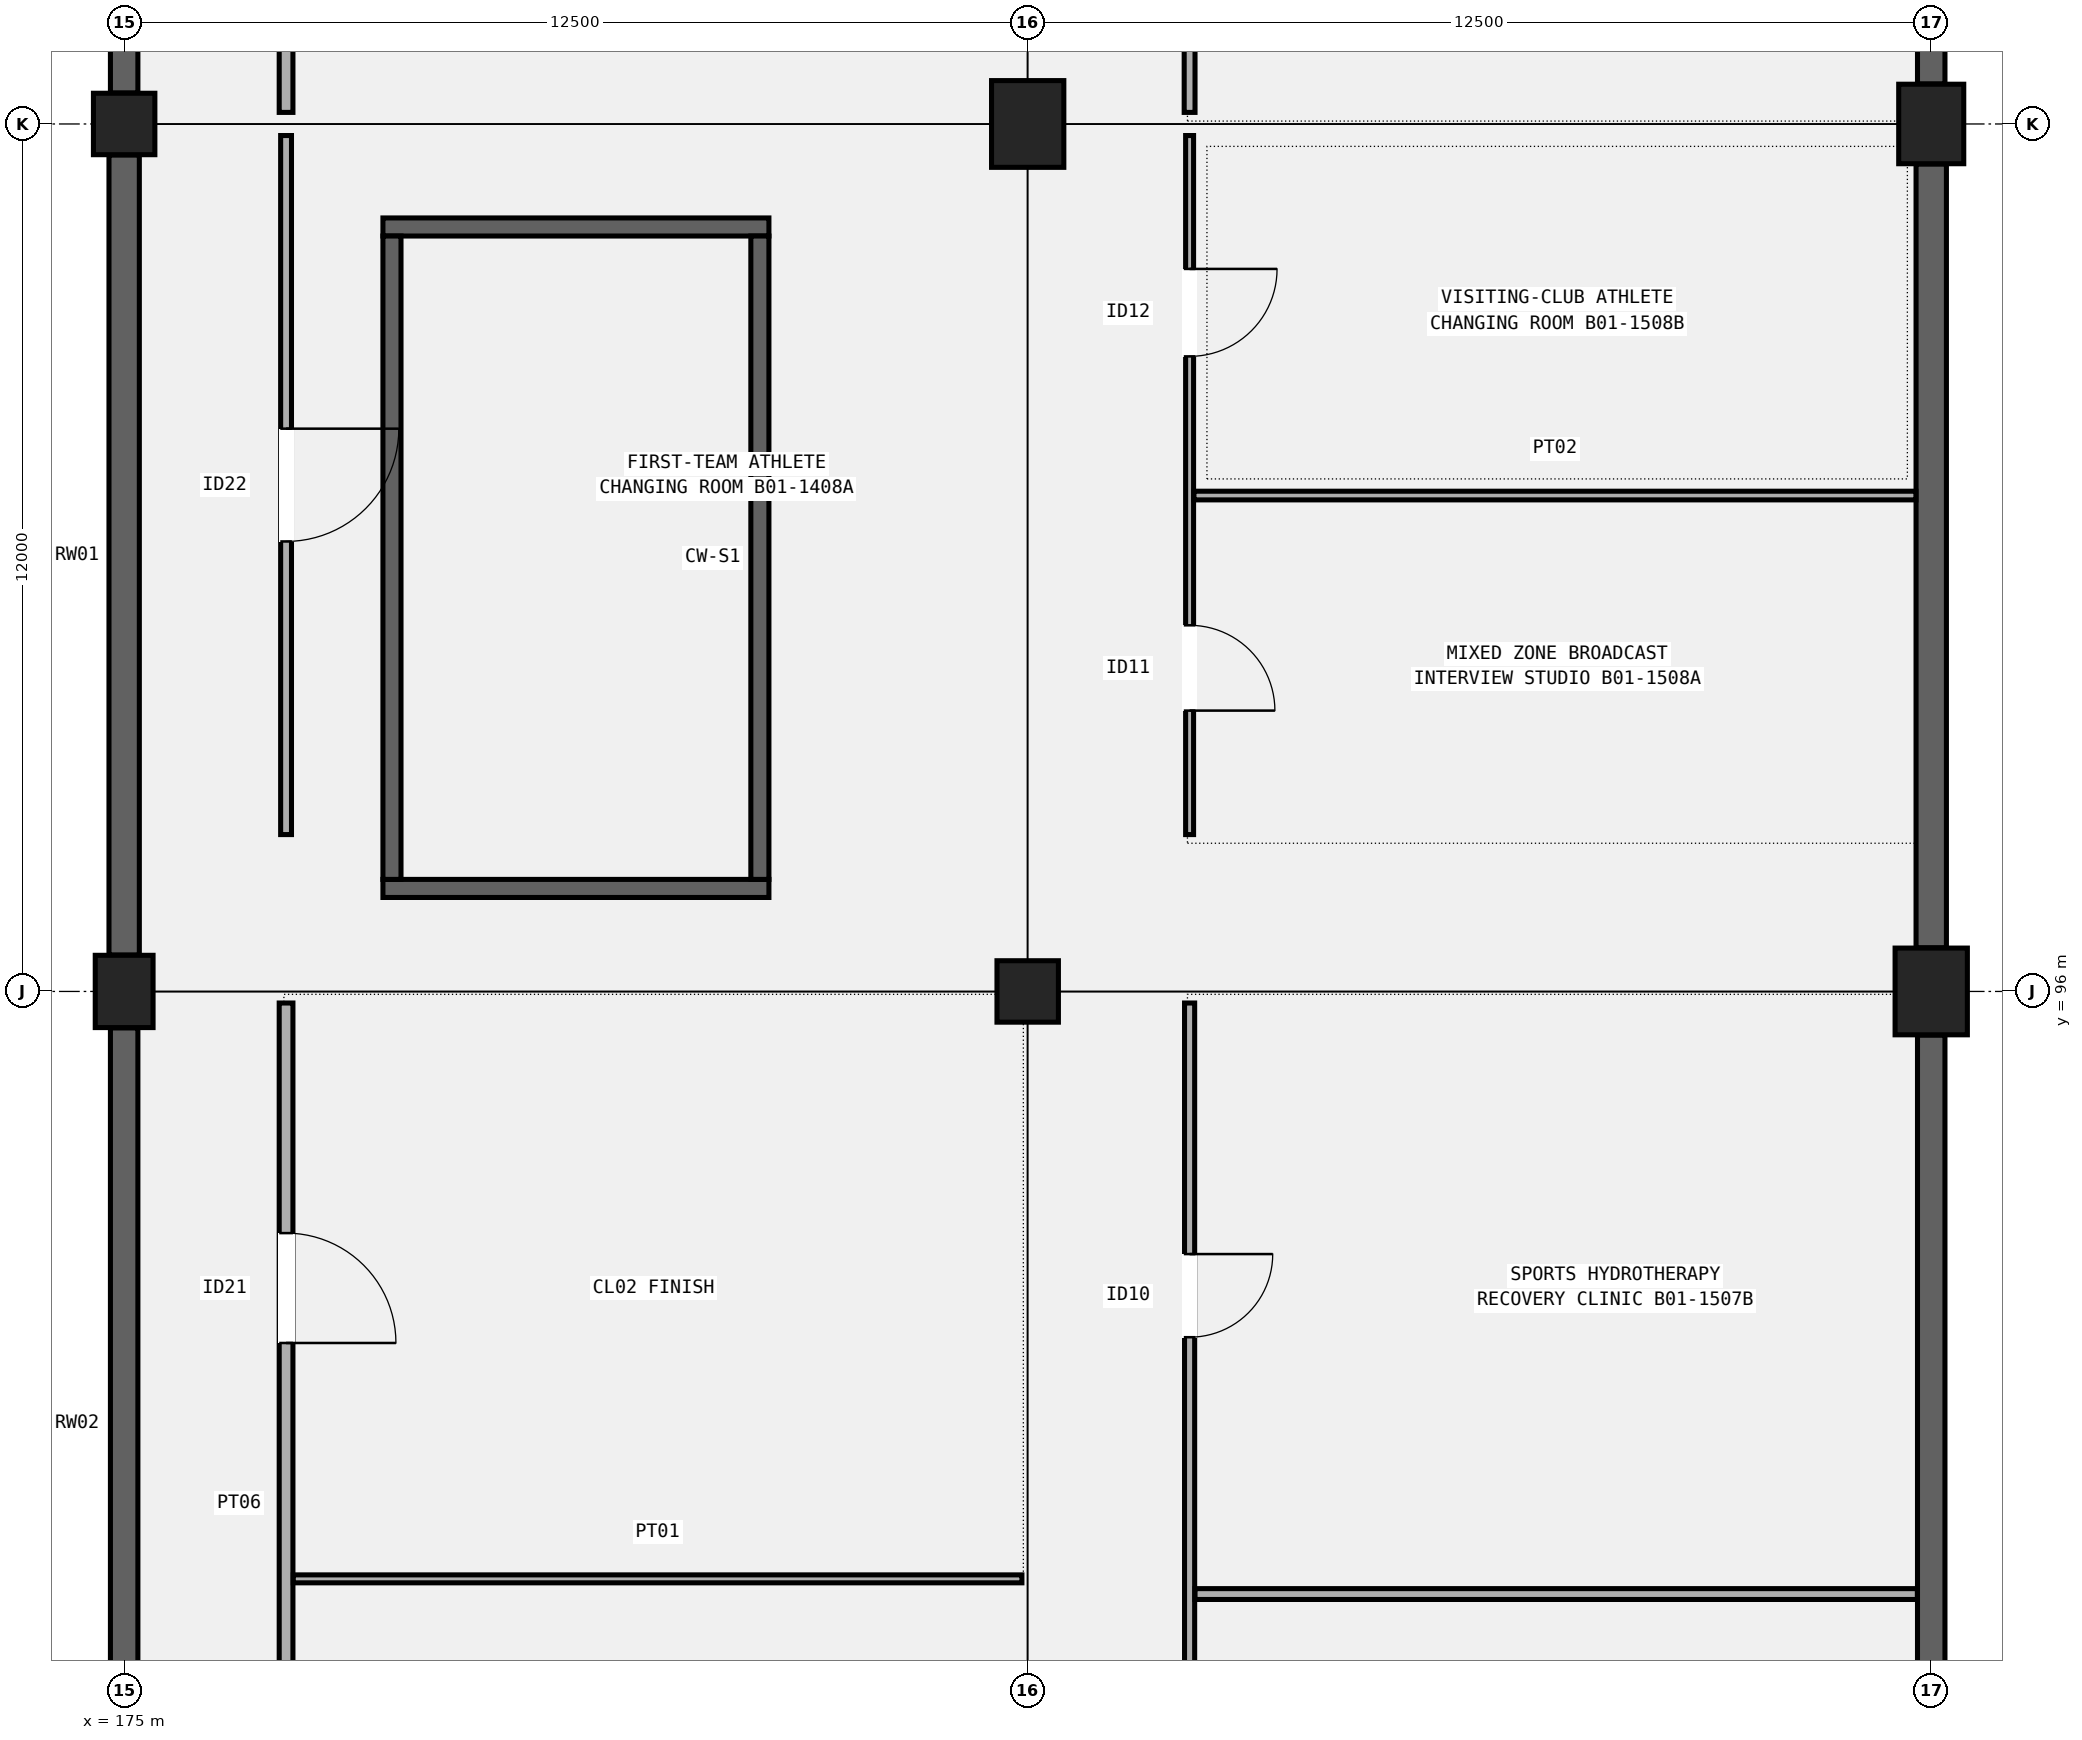
"""IFC4 building model, lengths in metres.
Left out: names, types, materials, properties, quantities, classifications, styles, units other than length and angle.
Written with IfcOpenShell. Run it as: python <this file> out.ifc"""

import sys

from ifc_helpers import new_model, si_unit, direction, frame, frame_2d, origin, origin_2d, place, context, subcontext, project, spatial, rectangle, circle, extrude, element, fill, save


model = new_model("IFC4")
c1 = context("Model", 3, precision=1e-05, world=origin(), true_north=direction((0.0, 1.0)))
c2 = subcontext(c1, "Body", "Model", "MODEL_VIEW")
j1 = project(units=[si_unit("LENGTHUNIT", "METRE"), si_unit("PLANEANGLEUNIT", "RADIAN")], contexts=[c1])
p1 = place(None, origin())
s1 = spatial("IfcSite", under=j1, at=p1, CompositionType="ELEMENT")
p2 = place(p1, origin())
s2 = spatial("IfcBuilding", under=s1, at=p2, CompositionType="ELEMENT")
p3 = place(p2, frame((0.0, 0.0, -4.8)))
s3 = spatial("IfcBuildingStorey", under=s2, at=p3, CompositionType="ELEMENT", Elevation=-4.8)
p4 = place(p3, frame((175.0, 96.0, 0.0), z_axis=(0.0, 0.0, 1.0), x_axis=(1.0, 0.0, 0.0)))
e1 = element("IfcColumn", 1, at=p4, inside=s3, PredefinedType="COLUMN", context=c2, shape_type="SweptSolid", body=[
    extrude(rectangle(XDim=0.8, YDim=1.0, at=origin_2d()), origin(), (0.0, 0.0, 1.0), 4.8),
])
for number, where, z_axis, x_axis in (
    (2, (175.0, 108.0, 0.0), (0.0, 0.0, 1.0), (1.0, 0.0, 0.0)),
    (3, (187.5, 96.0, 0.0), (0.0, 0.0, 1.0), (1.0, 0.0, 0.0)),
):
    element("IfcColumn", number, at=place(p3, frame(where, z_axis=z_axis, x_axis=x_axis)), inside=s3, PredefinedType="COLUMN", context=c2, shape_type="SweptSolid", body=[
        extrude(circle(Radius=0.425, at=origin_2d()), origin(), (0.0, 0.0, 1.0), 4.8),
    ])
for number, where, z_axis, x_axis in (
    (4, (187.5, 108.0, 0.0), (0.0, 0.0, 1.0), (1.0, 0.0, 0.0)),
    (5, (200.0, 96.0, 0.0), (0.0, 0.0, 1.0), (1.0, 0.0, 0.0)),
):
    element("IfcColumn", number, at=place(p3, frame(where, z_axis=z_axis, x_axis=x_axis)), inside=s3, PredefinedType="COLUMN", context=c2, shape_type="SweptSolid", body=[
        extrude(rectangle(XDim=1.0, YDim=1.2, at=origin_2d()), origin(), (0.0, 0.0, 1.0), 4.8),
    ])
p5 = place(p3, frame((200.0, 108.0, 0.0), z_axis=(0.0, 0.0, 1.0), x_axis=(1.0, 0.0, 0.0)))
e6 = element("IfcColumn", 6, at=p5, inside=s3, PredefinedType="COLUMN", context=c2, shape_type="SweptSolid", body=[
    extrude(rectangle(XDim=0.9, YDim=1.1, at=origin_2d()), origin(), (0.0, 0.0, 1.0), 4.8),
])
p6 = place(p3, frame((175.0, 84.554, 0.0), z_axis=(0.0, 0.0, 1.0), x_axis=(0.0, 1.0, 0.0)))
e7 = element("IfcWall", 7, at=p6, inside=s3, PredefinedType="STANDARD", context=c2, shape_type="SweptSolid", body=[
    extrude(rectangle(XDim=10.942, YDim=0.38, at=frame_2d((5.471, 0.0))), origin(), (0.0, 0.0, 1.0), 4.46),
])
p7 = place(p3, frame((175.0, 96.504, 0.0), z_axis=(0.0, 0.0, 1.0), x_axis=(0.0, 1.0, 0.0)))
e8 = element("IfcWall", 8, at=p7, inside=s3, PredefinedType="STANDARD", context=c2, shape_type="SweptSolid", body=[
    extrude(rectangle(XDim=11.067, YDim=0.42, at=frame_2d((5.534, 0.0))), origin(), (0.0, 0.0, 1.0), 4.46),
])
for number, where, z_axis, x_axis in (
    (9, (175.0, 108.429, 0.0), (0.0, 0.0, 1.0), (0.0, 1.0, 0.0)),
    (10, (200.0, 84.429, 0.0), (0.0, 0.0, 1.0), (0.0, 1.0, 0.0)),
):
    element("IfcWall", number, at=place(p3, frame(where, z_axis=z_axis, x_axis=x_axis)), inside=s3, PredefinedType="STANDARD", context=c2, shape_type="SweptSolid", body=[
        extrude(rectangle(XDim=10.967, YDim=0.38, at=frame_2d((5.483, 0.0))), origin(), (0.0, 0.0, 1.0), 4.46),
    ])
p8 = place(p3, frame((200.0, 96.604, 0.0), z_axis=(0.0, 0.0, 1.0), x_axis=(0.0, 1.0, 0.0)))
e11 = element("IfcWall", 11, at=p8, inside=s3, PredefinedType="STANDARD", context=c2, shape_type="SweptSolid", body=[
    extrude(rectangle(XDim=10.842, YDim=0.42, at=frame_2d((5.421, 0.0))), origin(), (0.0, 0.0, 1.0), 4.46),
])
p9 = place(p3, frame((200.0, 108.554, 0.0), z_axis=(0.0, 0.0, 1.0), x_axis=(0.0, 1.0, 0.0)))
e12 = element("IfcWall", 12, at=p9, inside=s3, PredefinedType="STANDARD", context=c2, shape_type="SweptSolid", body=[
    extrude(rectangle(XDim=10.942, YDim=0.38, at=frame_2d((5.471, 0.0))), origin(), (0.0, 0.0, 1.0), 4.46),
])
for number, where, z_axis, x_axis in (
    (13, (178.58, 97.425, 0.0), (0.0, 0.0, 1.0), (1.0, 0.0, 0.0)),
    (14, (178.58, 106.575, 0.0), (0.0, 0.0, 1.0), (1.0, 0.0, 0.0)),
):
    element("IfcWall", number, at=place(p3, frame(where, z_axis=z_axis, x_axis=x_axis)), inside=s3, PredefinedType="SHEAR", context=c2, shape_type="SweptSolid", body=[
        extrude(rectangle(XDim=5.34, YDim=0.25, at=frame_2d((2.67, 0.0))), origin(), (0.0, 0.0, 1.0), 4.5),
    ])
for number, where, z_axis, x_axis in (
    (15, (178.705, 97.55, 0.0), (0.0, 0.0, 1.0), (0.0, 1.0, 0.0)),
    (16, (183.795, 97.55, 0.0), (0.0, 0.0, 1.0), (0.0, 1.0, 0.0)),
):
    element("IfcWall", number, at=place(p3, frame(where, z_axis=z_axis, x_axis=x_axis)), inside=s3, PredefinedType="SHEAR", context=c2, shape_type="SweptSolid", body=[
        extrude(rectangle(XDim=8.9, YDim=0.25, at=frame_2d((4.45, 0.0))), origin(), (0.0, 0.0, 1.0), 4.5),
    ])
p10 = place(p3, frame((177.24, 84.16, 0.0), z_axis=(0.0, 0.0, 1.0), x_axis=(0.0, 1.0, 0.0)))
e17 = element("IfcWall", 17, at=p10, inside=s3, PredefinedType="PARTITIONING", context=c2, shape_type="SweptSolid", body=[
    extrude(rectangle(XDim=11.68, YDim=0.19, at=frame_2d((5.84, 0.0))), origin(), (0.0, 0.0, 1.0), 3.92),
])
p11 = place(p10, frame((2.557, 0.0, 0.0), z_axis=(0.0, 0.0, 1.0), x_axis=(-1.0, 0.0, 0.0)))
e18 = element("IfcOpeningElement", 18, at=p11, cuts=e17, PredefinedType="OPENING", context=c2, shape_type="SweptSolid", body=[
    extrude(rectangle(XDim=1.48, YDim=2.24, at=frame_2d((0.74, 1.12))), frame((0.0, 0.105, 0.0), z_axis=(0.0, -1.0, 0.0), x_axis=(1.0, 0.0, 0.0)), (0.0, 0.0, 1.0), 0.21),
])
p12 = place(p10, frame((8.497, 0.0, 0.0), z_axis=(0.0, 0.0, 1.0), x_axis=(-1.0, 0.0, 0.0)))
e19 = element("IfcOpeningElement", 19, at=p12, cuts=e17, PredefinedType="OPENING", context=c2, shape_type="SweptSolid", body=[
    extrude(rectangle(XDim=1.52, YDim=2.28, at=frame_2d((0.76, 1.14))), frame((0.0, 0.105, 0.0), z_axis=(0.0, -1.0, 0.0), x_axis=(1.0, 0.0, 0.0)), (0.0, 0.0, 1.0), 0.21),
])
p13 = place(p3, frame((177.34, 87.874, 0.0), z_axis=(0.0, 0.0, 1.0), x_axis=(1.0, 0.0, 0.0)))
e20 = element("IfcWall", 20, at=p13, inside=s3, PredefinedType="PARTITIONING", context=c2, shape_type="SweptSolid", body=[
    extrude(rectangle(XDim=10.08, YDim=0.11, at=frame_2d((5.04, 0.0))), origin(), (0.0, 0.0, 1.0), 3.92),
])
p14 = place(p3, frame((177.24, 98.17, 0.0), z_axis=(0.0, 0.0, 1.0), x_axis=(0.0, 1.0, 0.0)))
e21 = element("IfcWall", 21, at=p14, inside=s3, PredefinedType="PARTITIONING", context=c2, shape_type="SweptSolid", body=[
    extrude(rectangle(XDim=9.67, YDim=0.15, at=frame_2d((4.835, 0.0))), origin(), (0.0, 0.0, 1.0), 3.92),
])
p15 = place(p14, frame((5.615, 0.0, 0.0), z_axis=(0.0, 0.0, 1.0), x_axis=(-1.0, 0.0, 0.0)))
e22 = element("IfcOpeningElement", 22, at=p15, cuts=e21, PredefinedType="OPENING", context=c2, shape_type="SweptSolid", body=[
    extrude(rectangle(XDim=1.56, YDim=2.26, at=frame_2d((0.78, 1.13))), frame((0.0, 0.085, 0.0), z_axis=(0.0, -1.0, 0.0), x_axis=(1.0, 0.0, 0.0)), (0.0, 0.0, 1.0), 0.17),
])
p16 = place(p3, frame((177.24, 108.16, 0.0), z_axis=(0.0, 0.0, 1.0), x_axis=(0.0, 1.0, 0.0)))
e23 = element("IfcWall", 23, at=p16, inside=s3, PredefinedType="PARTITIONING", context=c2, shape_type="SweptSolid", body=[
    extrude(rectangle(XDim=11.68, YDim=0.19, at=frame_2d((5.84, 0.0))), origin(), (0.0, 0.0, 1.0), 3.92),
])
p17 = place(p16, frame((3.593, 0.0, 0.0), z_axis=(0.0, 0.0, 1.0), x_axis=(-1.0, 0.0, 0.0)))
e24 = element("IfcOpeningElement", 24, at=p17, cuts=e23, PredefinedType="OPENING", context=c2, shape_type="SweptSolid", body=[
    extrude(rectangle(XDim=1.6, YDim=2.3, at=frame_2d((0.8, 1.15))), frame((0.0, 0.105, 0.0), z_axis=(0.0, -1.0, 0.0), x_axis=(1.0, 0.0, 0.0)), (0.0, 0.0, 1.0), 0.21),
])
p18 = place(p16, frame((9.537, 0.0, 0.0), z_axis=(0.0, 0.0, 1.0), x_axis=(-1.0, 0.0, 0.0)))
e25 = element("IfcOpeningElement", 25, at=p18, cuts=e23, PredefinedType="OPENING", context=c2, shape_type="SweptSolid", body=[
    extrude(rectangle(XDim=1.65, YDim=2.28, at=frame_2d((0.825, 1.14))), frame((0.0, 0.105, 0.0), z_axis=(0.0, -1.0, 0.0), x_axis=(1.0, 0.0, 0.0)), (0.0, 0.0, 1.0), 0.21),
])
p19 = place(p3, frame((189.74, 84.16, 0.0), z_axis=(0.0, 0.0, 1.0), x_axis=(0.0, 1.0, 0.0)))
e26 = element("IfcWall", 26, at=p19, inside=s3, PredefinedType="PARTITIONING", context=c2, shape_type="SweptSolid", body=[
    extrude(rectangle(XDim=11.68, YDim=0.14, at=frame_2d((5.84, 0.0))), origin(), (0.0, 0.0, 1.0), 3.92),
])
p20 = place(p19, frame((2.272, 0.0, 0.0), z_axis=(0.0, 0.0, 1.0), x_axis=(-1.0, 0.0, 0.0)))
e27 = element("IfcOpeningElement", 27, at=p20, cuts=e26, PredefinedType="OPENING", context=c2, shape_type="SweptSolid", body=[
    extrude(rectangle(XDim=1.12, YDim=2.18, at=frame_2d((0.56, 1.09))), frame((0.0, 0.08, 0.0), z_axis=(0.0, -1.0, 0.0), x_axis=(1.0, 0.0, 0.0)), (0.0, 0.0, 1.0), 0.16),
])
p21 = place(p19, frame((8.207, 0.0, 0.0), z_axis=(0.0, 0.0, 1.0), x_axis=(-1.0, 0.0, 0.0)))
e28 = element("IfcOpeningElement", 28, at=p21, cuts=e26, PredefinedType="OPENING", context=c2, shape_type="SweptSolid", body=[
    extrude(rectangle(XDim=1.15, YDim=2.15, at=frame_2d((0.575, 1.075))), frame((0.0, 0.08, 0.0), z_axis=(0.0, -1.0, 0.0), x_axis=(1.0, 0.0, 0.0)), (0.0, 0.0, 1.0), 0.16),
])
p22 = place(p3, frame((189.815, 87.664, 0.0), z_axis=(0.0, 0.0, 1.0), x_axis=(1.0, 0.0, 0.0)))
e29 = element("IfcWall", 29, at=p22, inside=s3, PredefinedType="PARTITIONING", context=c2, shape_type="SweptSolid", body=[
    extrude(rectangle(XDim=9.993, YDim=0.15, at=frame_2d((4.997, 0.0))), origin(), (0.0, 0.0, 1.0), 3.92),
])
p23 = place(p3, frame((189.74, 98.17, 0.0), z_axis=(0.0, 0.0, 1.0), x_axis=(0.0, 1.0, 0.0)))
e30 = element("IfcWall", 30, at=p23, inside=s3, PredefinedType="PARTITIONING", context=c2, shape_type="SweptSolid", body=[
    extrude(rectangle(XDim=9.67, YDim=0.11, at=frame_2d((4.835, 0.0))), origin(), (0.0, 0.0, 1.0), 3.92),
])
p24 = place(p23, frame((2.895, 0.0, 0.0), z_axis=(0.0, 0.0, 1.0), x_axis=(-1.0, 0.0, 0.0)))
e31 = element("IfcOpeningElement", 31, at=p24, cuts=e30, PredefinedType="OPENING", context=c2, shape_type="SweptSolid", body=[
    extrude(rectangle(XDim=1.18, YDim=2.2, at=frame_2d((0.59, 1.1))), frame((0.0, 0.065, 0.0), z_axis=(0.0, -1.0, 0.0), x_axis=(1.0, 0.0, 0.0)), (0.0, 0.0, 1.0), 0.13),
])
p25 = place(p23, frame((7.825, 0.0, 0.0), z_axis=(0.0, 0.0, 1.0), x_axis=(-1.0, 0.0, 0.0)))
e32 = element("IfcOpeningElement", 32, at=p25, cuts=e30, PredefinedType="OPENING", context=c2, shape_type="SweptSolid", body=[
    extrude(rectangle(XDim=1.21, YDim=2.18, at=frame_2d((0.605, 1.09))), frame((0.0, 0.065, 0.0), z_axis=(0.0, -1.0, 0.0), x_axis=(1.0, 0.0, 0.0)), (0.0, 0.0, 1.0), 0.13),
])
p26 = place(p3, frame((189.8, 102.86, 0.0), z_axis=(0.0, 0.0, 1.0), x_axis=(1.0, 0.0, 0.0)))
e33 = element("IfcWall", 33, at=p26, inside=s3, PredefinedType="PARTITIONING", context=c2, shape_type="SweptSolid", body=[
    extrude(rectangle(XDim=9.988, YDim=0.12, at=frame_2d((4.994, 0.0))), origin(), (0.0, 0.0, 1.0), 3.92),
])
p27 = place(p3, frame((189.74, 108.16, 0.0), z_axis=(0.0, 0.0, 1.0), x_axis=(0.0, 1.0, 0.0)))
e34 = element("IfcWall", 34, at=p27, inside=s3, PredefinedType="PARTITIONING", context=c2, shape_type="SweptSolid", body=[
    extrude(rectangle(XDim=11.68, YDim=0.15, at=frame_2d((5.84, 0.0))), origin(), (0.0, 0.0, 1.0), 3.92),
])
p28 = place(p27, frame((6.46, 0.0, 0.0), z_axis=(0.0, 0.0, 1.0), x_axis=(-1.0, 0.0, 0.0)))
e35 = element("IfcOpeningElement", 35, at=p28, cuts=e34, PredefinedType="OPENING", context=c2, shape_type="SweptSolid", body=[
    extrude(rectangle(XDim=1.24, YDim=2.22, at=frame_2d((0.62, 1.11))), frame((0.0, 0.085, 0.0), z_axis=(0.0, -1.0, 0.0), x_axis=(1.0, 0.0, 0.0)), (0.0, 0.0, 1.0), 0.17),
])
p29 = place(p12, origin())
e36 = element("IfcDoor", 36, at=p29, inside=s3, OperationType="SINGLE_SWING_RIGHT", PredefinedType="DOOR", context=c2, shape_type="SweptSolid", body=[
    extrude(rectangle(XDim=1.52, YDim=2.28, at=frame_2d((0.76, 1.14))), frame((0.0, 0.025, 0.0), z_axis=(0.0, -1.0, 0.0), x_axis=(1.0, 0.0, 0.0)), (0.0, 0.0, 1.0), 0.05),
])
fill(e19, e36)
p30 = place(p15, origin())
e37 = element("IfcDoor", 37, at=p30, inside=s3, OperationType="SINGLE_SWING_LEFT", PredefinedType="DOOR", context=c2, shape_type="SweptSolid", body=[
    extrude(rectangle(XDim=1.56, YDim=2.26, at=frame_2d((0.78, 1.13))), frame((0.0, 0.025, 0.0), z_axis=(0.0, -1.0, 0.0), x_axis=(1.0, 0.0, 0.0)), (0.0, 0.0, 1.0), 0.05),
])
fill(e22, e37)
p31 = place(p21, origin())
e38 = element("IfcDoor", 38, at=p31, inside=s3, OperationType="SINGLE_SWING_LEFT", PredefinedType="DOOR", context=c2, shape_type="SweptSolid", body=[
    extrude(rectangle(XDim=1.15, YDim=2.15, at=frame_2d((0.575, 1.075))), frame((0.0, 0.025, 0.0), z_axis=(0.0, -1.0, 0.0), x_axis=(1.0, 0.0, 0.0)), (0.0, 0.0, 1.0), 0.05),
])
fill(e28, e38)
p32 = place(p24, origin())
e39 = element("IfcDoor", 39, at=p32, inside=s3, OperationType="SINGLE_SWING_RIGHT", PredefinedType="DOOR", context=c2, shape_type="SweptSolid", body=[
    extrude(rectangle(XDim=1.18, YDim=2.2, at=frame_2d((0.59, 1.1))), frame((0.0, 0.025, 0.0), z_axis=(0.0, -1.0, 0.0), x_axis=(1.0, 0.0, 0.0)), (0.0, 0.0, 1.0), 0.05),
])
fill(e31, e39)
p33 = place(p25, origin())
e40 = element("IfcDoor", 40, at=p33, inside=s3, OperationType="SINGLE_SWING_LEFT", PredefinedType="DOOR", context=c2, shape_type="SweptSolid", body=[
    extrude(rectangle(XDim=1.21, YDim=2.18, at=frame_2d((0.605, 1.09))), frame((0.0, 0.025, 0.0), z_axis=(0.0, -1.0, 0.0), x_axis=(1.0, 0.0, 0.0)), (0.0, 0.0, 1.0), 0.05),
])
fill(e32, e40)
save(model, sys.argv[1])
